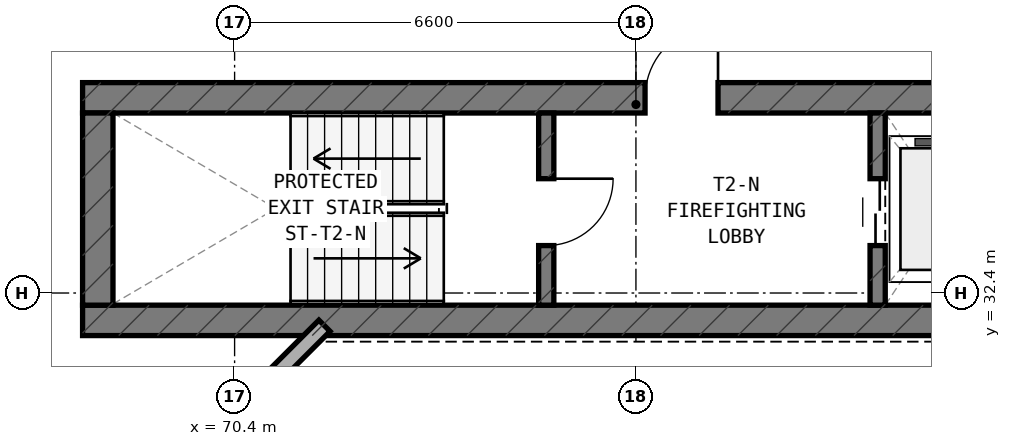
"""IFC4 building model, lengths in metres.
Left out: names, types, materials, properties, quantities, classifications, styles, units other than length and angle.
Written with IfcOpenShell. Run it as: python <this file> out.ifc"""

import sys

from ifc_helpers import new_model, si_unit, direction, frame, frame_2d, origin, place, context, subcontext, project, spatial, rectangle, extrude, element, fill, save


model = new_model("IFC4")
c1 = context("Model", 3, precision=1e-05, world=origin(), true_north=direction((0.0, 1.0)))
c2 = subcontext(c1, "Body", "Model", "MODEL_VIEW")
j1 = project(units=[si_unit("LENGTHUNIT", "METRE"), si_unit("PLANEANGLEUNIT", "RADIAN")], contexts=[c1])
p1 = place(None, origin())
s1 = spatial("IfcSite", under=j1, at=p1, CompositionType="ELEMENT")
p2 = place(p1, origin())
s2 = spatial("IfcBuilding", under=s1, at=p2, CompositionType="ELEMENT")
p3 = place(p2, frame((0.0, 0.0, 83.5)))
s3 = spatial("IfcBuildingStorey", under=s2, at=p3, CompositionType="ELEMENT", Elevation=83.5)
p4 = place(p3, frame((67.9, 31.95, 0.0), z_axis=(0.0, 0.0, 1.0), x_axis=(1.0, 0.0, 0.0)))
e1 = element("IfcWall", 1, at=p4, inside=s3, PredefinedType="SHEAR", context=c2, shape_type="SweptSolid", body=[
    extrude(rectangle(XDim=18.4, YDim=0.5, at=frame_2d((9.2, 0.0))), origin(), (0.0, 0.0, 1.0), 3.5),
])
p5 = place(p3, frame((67.9, 35.61, 0.0), z_axis=(0.0, 0.0, 1.0), x_axis=(1.0, 0.0, 0.0)))
e2 = element("IfcWall", 2, at=p5, inside=s3, PredefinedType="SHEAR", context=c2, shape_type="SweptSolid", body=[
    extrude(rectangle(XDim=18.4, YDim=0.5, at=frame_2d((9.2, 0.0))), origin(), (0.0, 0.0, 1.0), 3.5),
])
p6 = place(p5, frame((9.25, 0.0, 0.0)))
e3 = element("IfcOpeningElement", 3, at=p6, cuts=e2, PredefinedType="OPENING", context=c2, shape_type="SweptSolid", body=[
    extrude(rectangle(XDim=1.2, YDim=2.15, at=frame_2d((0.6, 1.075))), frame((0.0, 0.26, 0.0), z_axis=(0.0, -1.0, 0.0), x_axis=(1.0, 0.0, 0.0)), (0.0, 0.0, 1.0), 0.52),
])
p7 = place(p5, frame((16.85, 0.0, 0.0)))
e4 = element("IfcOpeningElement", 4, at=p7, cuts=e2, PredefinedType="OPENING", context=c2, shape_type="SweptSolid", body=[
    extrude(rectangle(XDim=0.85, YDim=2.1, at=frame_2d((0.425, 1.05))), frame((0.0, 0.26, 0.0), z_axis=(0.0, -1.0, 0.0), x_axis=(1.0, 0.0, 0.0)), (0.0, 0.0, 1.0), 0.52),
])
p8 = place(p3, frame((68.15, 32.2, 0.0), z_axis=(0.0, 0.0, 1.0), x_axis=(0.0, 1.0, 0.0)))
e5 = element("IfcWall", 5, at=p8, inside=s3, PredefinedType="SHEAR", context=c2, shape_type="SweptSolid", body=[
    extrude(rectangle(XDim=3.16, YDim=0.5, at=frame_2d((1.58, 0.0))), origin(), (0.0, 0.0, 1.0), 3.5),
])
p9 = place(p3, frame((75.525, 32.2, 0.0), z_axis=(0.0, 0.0, 1.0), x_axis=(0.0, 1.0, 0.0)))
e6 = element("IfcWall", 6, at=p9, inside=s3, PredefinedType="STANDARD", context=c2, shape_type="SweptSolid", body=[
    extrude(rectangle(XDim=3.16, YDim=0.25, at=frame_2d((1.58, 0.0))), origin(), (0.0, 0.0, 1.0), 3.25),
])
p10 = place(p9, frame((0.98, 0.0, 0.0)))
e7 = element("IfcOpeningElement", 7, at=p10, cuts=e6, PredefinedType="OPENING", context=c2, shape_type="SweptSolid", body=[
    extrude(rectangle(XDim=1.1, YDim=2.15, at=frame_2d((0.55, 1.075))), frame((0.0, 0.135, 0.0), z_axis=(0.0, -1.0, 0.0), x_axis=(1.0, 0.0, 0.0)), (0.0, 0.0, 1.0), 0.27),
])
p11 = place(p3, frame((80.975, 32.2, 0.0), z_axis=(0.0, 0.0, 1.0), x_axis=(0.0, 1.0, 0.0)))
e8 = element("IfcWall", 8, at=p11, inside=s3, PredefinedType="STANDARD", context=c2, shape_type="SweptSolid", body=[
    extrude(rectangle(XDim=3.16, YDim=0.25, at=frame_2d((1.58, 0.0))), origin(), (0.0, 0.0, 1.0), 3.25),
])
p12 = place(p11, frame((0.98, 0.0, 0.0)))
e9 = element("IfcOpeningElement", 9, at=p12, cuts=e8, PredefinedType="OPENING", context=c2, shape_type="SweptSolid", body=[
    extrude(rectangle(XDim=1.1, YDim=2.15, at=frame_2d((0.55, 1.075))), frame((0.0, 0.135, 0.0), z_axis=(0.0, -1.0, 0.0), x_axis=(1.0, 0.0, 0.0)), (0.0, 0.0, 1.0), 0.27),
])
p13 = place(p3, frame((71.878, 31.862, 0.0), z_axis=(0.0, 0.0, 1.0), x_axis=(-0.707106781187, -0.707106781187, 0.0)))
e10 = element("IfcWall", 10, at=p13, inside=s3, PredefinedType="STANDARD", context=c2, shape_type="SweptSolid", body=[
    extrude(rectangle(XDim=2.311, YDim=0.26, at=frame_2d((1.155, 0.0))), origin(), (0.0, 0.0, 1.0), 3.25),
])
p14 = place(p10, frame((1.1, 0.0, 0.0), z_axis=(0.0, 0.0, 1.0), x_axis=(-1.0, 0.0, 0.0)))
e11 = element("IfcDoor", 11, at=p14, inside=s3, OperationType="SINGLE_SWING_LEFT", PredefinedType="DOOR", context=c2, shape_type="SweptSolid", body=[
    extrude(rectangle(XDim=1.1, YDim=2.15, at=frame_2d((0.55, 1.075))), frame((0.0, 0.025, 0.0), z_axis=(0.0, -1.0, 0.0), x_axis=(1.0, 0.0, 0.0)), (0.0, 0.0, 1.0), 0.05),
])
fill(e7, e11)
p15 = place(p6, origin())
e12 = element("IfcDoor", 12, at=p15, inside=s3, OperationType="SINGLE_SWING_RIGHT", PredefinedType="DOOR", context=c2, shape_type="SweptSolid", body=[
    extrude(rectangle(XDim=1.2, YDim=2.15, at=frame_2d((0.6, 1.075))), frame((0.0, 0.025, 0.0), z_axis=(0.0, -1.0, 0.0), x_axis=(1.0, 0.0, 0.0)), (0.0, 0.0, 1.0), 0.05),
])
fill(e3, e12)
p16 = place(p12, origin())
e13 = element("IfcDoor", 13, at=p16, inside=s3, OperationType="DOUBLE_DOOR_SLIDING", PredefinedType="DOOR", context=c2, shape_type="SweptSolid", body=[
    extrude(rectangle(XDim=1.1, YDim=2.15, at=frame_2d((0.55, 1.075))), frame((0.0, 0.025, 0.0), z_axis=(0.0, -1.0, 0.0), x_axis=(1.0, 0.0, 0.0)), (0.0, 0.0, 1.0), 0.05),
])
fill(e9, e13)
save(model, sys.argv[1])
